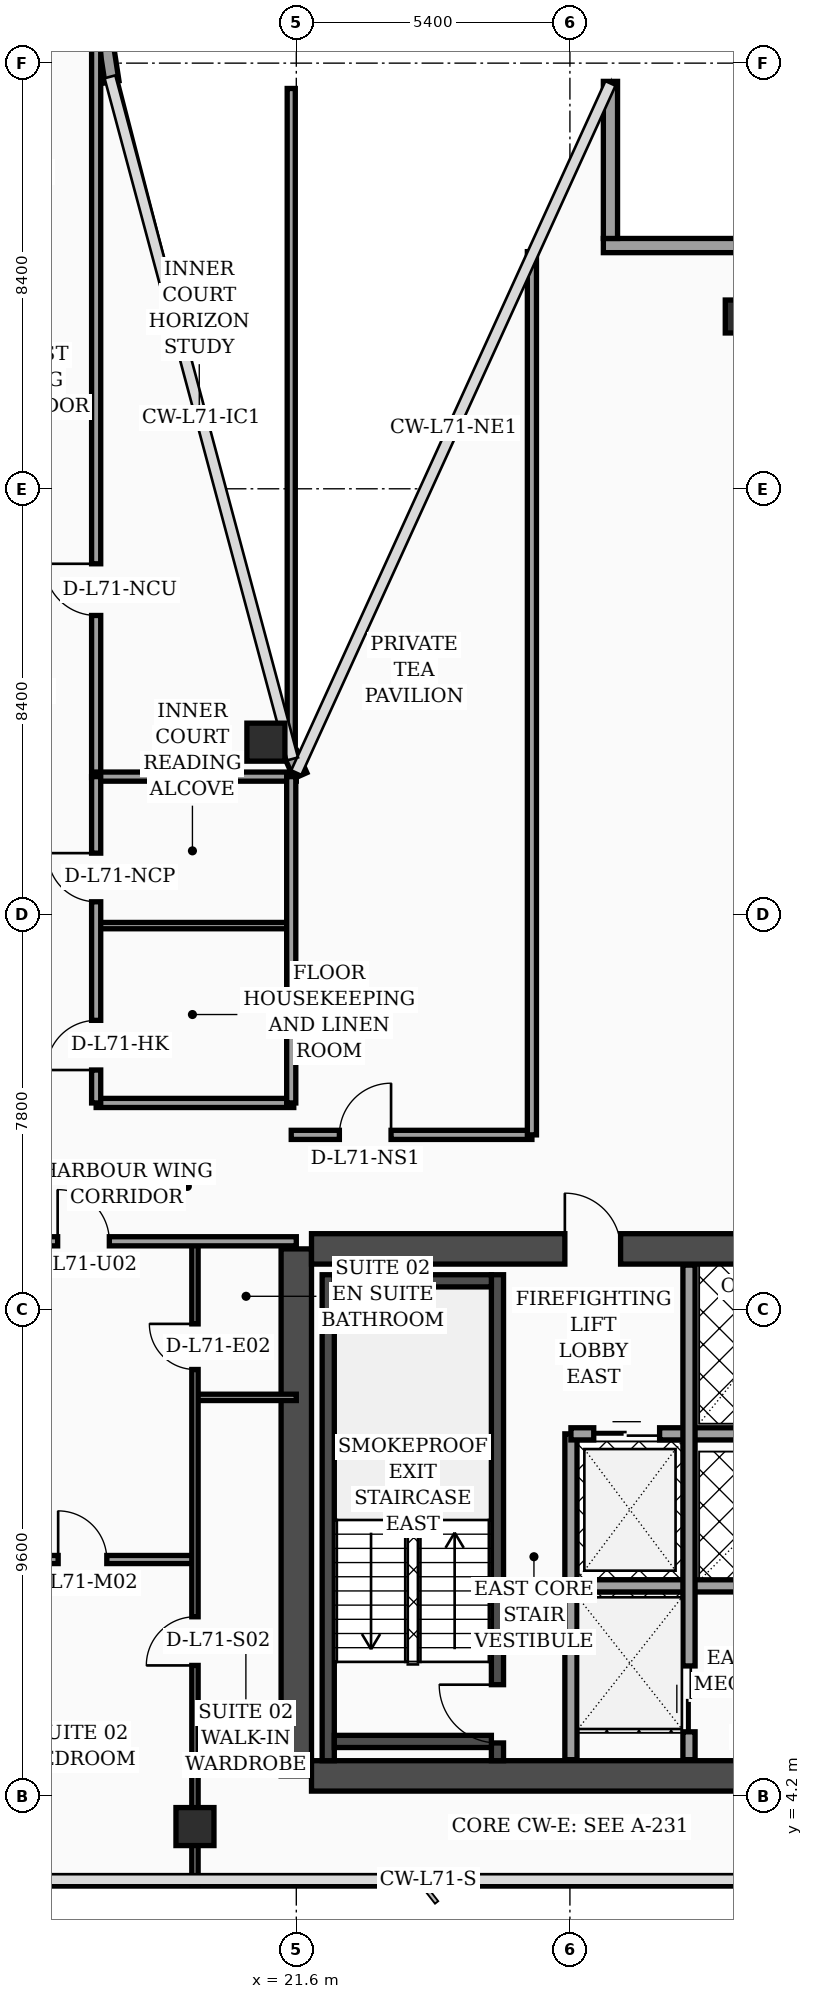
"""IFC4 building model, lengths in metres.
Left out: names, types, materials, properties, quantities, classifications, styles, units other than length and angle.
Written with IfcOpenShell. Run it as: python <this file> out.ifc"""

import sys

from ifc_helpers import new_model, si_unit, direction, frame, frame_2d, origin, origin_2d, place, context, subcontext, project, spatial, rectangle, hollow_rectangle, extrude, element, fill, save


model = new_model("IFC4")
c1 = context("Model", 3, precision=1e-05, world=origin(), true_north=direction((0.0, 1.0)))
c2 = subcontext(c1, "Body", "Model", "MODEL_VIEW")
j1 = project(units=[si_unit("LENGTHUNIT", "METRE"), si_unit("PLANEANGLEUNIT", "RADIAN")], contexts=[c1])
p1 = place(None, origin())
s1 = spatial("IfcSite", under=j1, at=p1, CompositionType="ELEMENT")
p2 = place(p1, origin())
s2 = spatial("IfcBuilding", under=s1, at=p2, CompositionType="ELEMENT")
p3 = place(p2, frame((0.0, 0.0, 287.3)))
s3 = spatial("IfcBuildingStorey", under=s2, at=p3, CompositionType="ELEMENT", Elevation=287.3)
p4 = place(p3, frame((21.6, 4.6, 0.0), z_axis=(0.0, 0.0, 1.0), x_axis=(0.0, 1.0, 0.0)))
e1 = element("IfcWall", 1, at=p4, inside=s3, PredefinedType="SHEAR", context=c2, shape_type="SweptSolid", body=[
    extrude(rectangle(XDim=10.4, YDim=0.6, at=frame_2d((5.2, 0.0))), origin(), (0.0, 0.0, 1.0), 3.56),
])
p5 = place(p3, frame((21.9, 15.0, 0.0), z_axis=(0.0, 0.0, 1.0), x_axis=(1.0, 0.0, 0.0)))
e2 = element("IfcWall", 2, at=p5, inside=s3, PredefinedType="SHEAR", context=c2, shape_type="SweptSolid", body=[
    extrude(rectangle(XDim=10.2, YDim=0.6, at=frame_2d((5.1, 0.0))), origin(), (0.0, 0.0, 1.0), 3.56),
])
p6 = place(p5, frame((5.0, 0.0, 0.0)))
e3 = element("IfcOpeningElement", 3, at=p6, cuts=e2, PredefinedType="OPENING", context=c2, shape_type="SweptSolid", body=[
    extrude(rectangle(XDim=1.1, YDim=2.2, at=frame_2d((0.55, 1.1))), frame((0.0, 0.31, 0.0), z_axis=(0.0, -1.0, 0.0), x_axis=(1.0, 0.0, 0.0)), (0.0, 0.0, 1.0), 0.62),
])
p7 = place(p3, frame((21.9, 4.6, 0.0), z_axis=(0.0, 0.0, 1.0), x_axis=(1.0, 0.0, 0.0)))
e4 = element("IfcWall", 4, at=p7, inside=s3, PredefinedType="SHEAR", context=c2, shape_type="SweptSolid", body=[
    extrude(rectangle(XDim=10.2, YDim=0.6, at=frame_2d((5.1, 0.0))), origin(), (0.0, 0.0, 1.0), 3.56),
])
p8 = place(p3, frame((22.23, 4.9, 0.0), z_axis=(0.0, 0.0, 1.0), x_axis=(0.0, 1.0, 0.0)))
e5 = element("IfcWall", 5, at=p8, inside=s3, PredefinedType="SOLIDWALL", context=c2, shape_type="SweptSolid", body=[
    extrude(rectangle(XDim=9.59, YDim=0.24, at=frame_2d((4.795, 0.0))), origin(), (0.0, 0.0, 1.0), 3.56),
])
p9 = place(p3, frame((25.57, 4.9, 0.0), z_axis=(0.0, 0.0, 1.0), x_axis=(0.0, 1.0, 0.0)))
e6 = element("IfcWall", 6, at=p9, inside=s3, PredefinedType="SOLIDWALL", context=c2, shape_type="SweptSolid", body=[
    extrude(rectangle(XDim=9.59, YDim=0.24, at=frame_2d((4.795, 0.0))), origin(), (0.0, 0.0, 1.0), 3.56),
])
p10 = place(p9, frame((0.35, 0.0, 0.0)))
e7 = element("IfcOpeningElement", 7, at=p10, cuts=e6, PredefinedType="OPENING", context=c2, shape_type="SweptSolid", body=[
    extrude(rectangle(XDim=1.15, YDim=2.2, at=frame_2d((0.575, 1.1))), frame((0.0, 0.13, 0.0), z_axis=(0.0, -1.0, 0.0), x_axis=(1.0, 0.0, 0.0)), (0.0, 0.0, 1.0), 0.26),
])
for number, where, z_axis, x_axis in (
    (8, (22.35, 5.28, 0.0), (0.0, 0.0, 1.0), (1.0, 0.0, 0.0)),
    (9, (22.35, 14.37, 0.0), (0.0, 0.0, 1.0), (1.0, 0.0, 0.0)),
):
    element("IfcWall", number, at=place(p3, frame(where, z_axis=z_axis, x_axis=x_axis)), inside=s3, PredefinedType="SOLIDWALL", context=c2, shape_type="SweptSolid", body=[
        extrude(rectangle(XDim=3.1, YDim=0.24, at=frame_2d((1.55, 0.0))), origin(), (0.0, 0.0, 1.0), 3.56),
    ])
for number, where, z_axis, x_axis in (
    (10, (21.0, 25.0, 0.0), (0.0, 0.0, 1.0), (1.0, 0.0, 0.0)),
    (11, (19.6, 3.6, 0.0), (0.0, 0.0, 1.0), (1.0, 0.0, 0.0)),
):
    element("IfcColumn", number, at=place(p3, frame(where, z_axis=z_axis, x_axis=x_axis)), inside=s3, PredefinedType="COLUMN", context=c2, shape_type="SweptSolid", body=[
        extrude(hollow_rectangle(XDim=0.75, YDim=0.75, WallThickness=0.032, at=origin_2d()), origin(), (0.0, 0.0, 1.0), 3.56),
    ])
p11 = place(p3, frame((30.391, 33.4, 0.0), z_axis=(0.0, 0.0, 1.0), x_axis=(1.0, 0.0, 0.0)))
e12 = element("IfcColumn", 12, at=p11, inside=s3, PredefinedType="COLUMN", context=c2, shape_type="SweptSolid", body=[
    extrude(hollow_rectangle(XDim=0.65, YDim=0.65, WallThickness=0.028, at=origin_2d()), origin(), (0.0, 0.0, 1.0), 3.56),
])
p12 = place(p3, frame((21.68, 24.34, 0.0), z_axis=(0.0, 0.0, 1.0), x_axis=(-0.40758134973, 0.913168901875, 0.0)))
e13 = element("IfcWall", 13, at=p12, inside=s3, PredefinedType="SOLIDWALL", context=c2, shape_type="SweptSolid", body=[
    extrude(rectangle(XDim=0.471, YDim=0.28, at=frame_2d((0.235, 0.0))), origin(), (0.0, 0.0, 1.0), 3.56),
])
p13 = place(p3, frame((17.962, 38.03, 0.0), z_axis=(0.0, 0.0, 1.0), x_axis=(-0.15141125477, 0.988470855377, 0.0)))
e14 = element("IfcWall", 14, at=p13, inside=s3, PredefinedType="SOLIDWALL", context=c2, shape_type="SweptSolid", body=[
    extrude(rectangle(XDim=0.739, YDim=0.28, at=frame_2d((0.369, 0.0))), origin(), (0.0, 0.0, 1.0), 3.56),
])
p14 = place(p3, frame((31.84, 34.8, 0.0), z_axis=(0.0, 0.0, 1.0), x_axis=(-1.0, 0.0, 0.0)))
e15 = element("IfcWall", 15, at=p14, inside=s3, PredefinedType="SOLIDWALL", context=c2, shape_type="SweptSolid", body=[
    extrude(rectangle(XDim=4.18, YDim=0.28, at=frame_2d((2.09, 0.0))), origin(), (0.0, 0.0, 1.0), 3.56),
])
p15 = place(p3, frame((27.8, 34.94, 0.0), z_axis=(0.0, 0.0, 1.0), x_axis=(0.0, 1.0, 0.0)))
e16 = element("IfcWall", 16, at=p15, inside=s3, PredefinedType="SOLIDWALL", context=c2, shape_type="SweptSolid", body=[
    extrude(rectangle(XDim=3.1, YDim=0.28, at=frame_2d((1.55, 0.0))), origin(), (0.0, 0.0, 1.0), 3.56),
])
p16 = place(p3, frame((27.02, 4.92, 0.0), z_axis=(0.0, 0.0, 1.0), x_axis=(0.0, 1.0, 0.0)))
e17 = element("IfcWall", 17, at=p16, inside=s3, PredefinedType="SOLIDWALL", context=c2, shape_type="SweptSolid", body=[
    extrude(rectangle(XDim=6.43, YDim=0.24, at=frame_2d((3.215, 0.0))), origin(), (0.0, 0.0, 1.0), 3.56),
])
p17 = place(p3, frame((27.02, 11.35, 0.0), z_axis=(0.0, 0.0, 1.0), x_axis=(1.0, 0.0, 0.0)))
e18 = element("IfcWall", 18, at=p17, inside=s3, PredefinedType="SOLIDWALL", context=c2, shape_type="SweptSolid", body=[
    extrude(rectangle(XDim=5.06, YDim=0.24, at=frame_2d((2.53, 0.0))), origin(), (0.0, 0.0, 1.0), 3.56),
])
p18 = place(p17, frame((0.45, 0.0, 0.0)))
e19 = element("IfcOpeningElement", 19, at=p18, cuts=e18, PredefinedType="OPENING", context=c2, shape_type="SweptSolid", body=[
    extrude(rectangle(XDim=1.3, YDim=2.35, at=frame_2d((0.65, 1.175))), frame((0.0, 0.13, 0.0), z_axis=(0.0, -1.0, 0.0), x_axis=(1.0, 0.0, 0.0)), (0.0, 0.0, 1.0), 0.26),
])
p19 = place(p3, frame((27.02, 8.35, 0.0), z_axis=(0.0, 0.0, 1.0), x_axis=(1.0, 0.0, 0.0)))
e20 = element("IfcWall", 20, at=p19, inside=s3, PredefinedType="SOLIDWALL", context=c2, shape_type="SweptSolid", body=[
    extrude(rectangle(XDim=5.06, YDim=0.24, at=frame_2d((2.53, 0.0))), origin(), (0.0, 0.0, 1.0), 3.09),
])
p20 = place(p3, frame((29.35, 4.92, 0.0), z_axis=(0.0, 0.0, 1.0), x_axis=(0.0, 1.0, 0.0)))
e21 = element("IfcWall", 21, at=p20, inside=s3, PredefinedType="SOLIDWALL", context=c2, shape_type="SweptSolid", body=[
    extrude(rectangle(XDim=9.76, YDim=0.24, at=frame_2d((4.88, 0.0))), origin(), (0.0, 0.0, 1.0), 3.56),
])
p21 = place(p20, frame((0.55, 0.0, 0.0)))
e22 = element("IfcOpeningElement", 22, at=p21, cuts=e21, PredefinedType="OPENING", context=c2, shape_type="SweptSolid", body=[
    extrude(rectangle(XDim=1.3, YDim=2.35, at=frame_2d((0.65, 1.175))), frame((0.0, 0.13, 0.0), z_axis=(0.0, -1.0, 0.0), x_axis=(1.0, 0.0, 0.0)), (0.0, 0.0, 1.0), 0.26),
])
p22 = place(p3, frame((19.6, 12.07, 0.0), z_axis=(0.0, 0.0, 1.0), x_axis=(1.0, 0.0, 0.0)))
e23 = element("IfcWall", 23, at=p22, inside=s3, PredefinedType="PARTITIONING", context=c2, shape_type="SweptSolid", body=[
    extrude(rectangle(XDim=2.0, YDim=0.125, at=frame_2d((1.0, 0.0))), origin(), (0.0, 0.0, 1.0), 3.56),
])
p23 = place(p3, frame((15.15, 8.87, 0.0), z_axis=(0.0, 0.0, 1.0), x_axis=(1.0, 0.0, 0.0)))
e24 = element("IfcWall", 24, at=p23, inside=s3, PredefinedType="PARTITIONING", context=c2, shape_type="SweptSolid", body=[
    extrude(rectangle(XDim=4.45, YDim=0.16, at=frame_2d((2.225, 0.0))), origin(), (0.0, 0.0, 1.0), 3.56),
])
p24 = place(p23, frame((1.75, 0.0, 0.0)))
e25 = element("IfcOpeningElement", 25, at=p24, cuts=e24, PredefinedType="OPENING", context=c2, shape_type="SweptSolid", body=[
    extrude(rectangle(XDim=0.96, YDim=2.2, at=frame_2d((0.48, 1.1))), frame((0.0, 0.09, 0.0), z_axis=(0.0, -1.0, 0.0), x_axis=(1.0, 0.0, 0.0)), (0.0, 0.0, 1.0), 0.18),
])
p25 = place(p3, frame((19.6, 2.44, 0.0), z_axis=(0.0, 0.0, 1.0), x_axis=(0.0, 1.0, 0.0)))
e26 = element("IfcWall", 26, at=p25, inside=s3, PredefinedType="PARTITIONING", context=c2, shape_type="SweptSolid", body=[
    extrude(rectangle(XDim=12.71, YDim=0.125, at=frame_2d((6.355, 0.0))), origin(), (0.0, 0.0, 1.0), 2.59),
])
p26 = place(p25, frame((4.34, 0.0, 0.0)))
e27 = element("IfcOpeningElement", 27, at=p26, cuts=e26, PredefinedType="OPENING", context=c2, shape_type="SweptSolid", body=[
    extrude(rectangle(XDim=0.96, YDim=2.2, at=frame_2d((0.48, 1.1))), frame((0.0, 0.073, 0.0), z_axis=(0.0, -1.0, 0.0), x_axis=(1.0, 0.0, 0.0)), (0.0, 0.0, 1.0), 0.145),
])
p27 = place(p25, frame((10.18, 0.0, 0.0)))
e28 = element("IfcOpeningElement", 28, at=p27, cuts=e26, PredefinedType="OPENING", context=c2, shape_type="SweptSolid", body=[
    extrude(rectangle(XDim=0.9, YDim=2.15, at=frame_2d((0.45, 1.075))), frame((0.0, 0.073, 0.0), z_axis=(0.0, -1.0, 0.0), x_axis=(1.0, 0.0, 0.0)), (0.0, 0.0, 1.0), 0.145),
])
p28 = place(p3, frame((15.15, 15.15, 0.0), z_axis=(0.0, 0.0, 1.0), x_axis=(1.0, 0.0, 0.0)))
e29 = element("IfcWall", 29, at=p28, inside=s3, PredefinedType="PARTITIONING", context=c2, shape_type="SweptSolid", body=[
    extrude(rectangle(XDim=6.45, YDim=0.18, at=frame_2d((3.225, 0.0))), origin(), (0.0, 0.0, 1.0), 2.59),
])
p29 = place(p28, frame((1.74, 0.0, 0.0)))
e30 = element("IfcOpeningElement", 30, at=p29, cuts=e29, PredefinedType="OPENING", context=c2, shape_type="SweptSolid", body=[
    extrude(rectangle(XDim=1.02, YDim=2.2, at=frame_2d((0.51, 1.1))), frame((0.0, 0.1, 0.0), z_axis=(0.0, -1.0, 0.0), x_axis=(1.0, 0.0, 0.0)), (0.0, 0.0, 1.0), 0.2),
])
p30 = place(p3, frame((17.65, 24.3, 0.0), z_axis=(0.0, 0.0, 1.0), x_axis=(0.0, 1.0, 0.0)))
e31 = element("IfcWall", 31, at=p30, inside=s3, PredefinedType="PARTITIONING", context=c2, shape_type="SweptSolid", body=[
    extrude(rectangle(XDim=18.15, YDim=0.18, at=frame_2d((9.075, 0.0))), origin(), (0.0, 0.0, 1.0), 2.99),
])
p31 = place(p30, frame((3.2, 0.0, 0.0)))
e32 = element("IfcOpeningElement", 32, at=p31, cuts=e31, PredefinedType="OPENING", context=c2, shape_type="SweptSolid", body=[
    extrude(rectangle(XDim=1.02, YDim=2.2, at=frame_2d((0.51, 1.1))), frame((0.0, 0.1, 0.0), z_axis=(0.0, -1.0, 0.0), x_axis=(1.0, 0.0, 0.0)), (0.0, 0.0, 1.0), 0.2),
])
p32 = place(p3, frame((17.65, 17.88, 0.0), z_axis=(0.0, 0.0, 1.0), x_axis=(1.0, 0.0, 0.0)))
e33 = element("IfcWall", 33, at=p32, inside=s3, PredefinedType="PARTITIONING", context=c2, shape_type="SweptSolid", body=[
    extrude(rectangle(XDim=3.9, YDim=0.18, at=frame_2d((1.95, 0.0))), origin(), (0.0, 0.0, 1.0), 3.56),
])
p33 = place(p3, frame((17.65, 21.38, 0.0), z_axis=(0.0, 0.0, 1.0), x_axis=(1.0, 0.0, 0.0)))
e34 = element("IfcWall", 34, at=p33, inside=s3, PredefinedType="PARTITIONING", context=c2, shape_type="SweptSolid", body=[
    extrude(rectangle(XDim=3.9, YDim=0.125, at=frame_2d((1.95, 0.0))), origin(), (0.0, 0.0, 1.0), 3.56),
])
p34 = place(p3, frame((17.65, 24.32, 0.0), z_axis=(0.0, 0.0, 1.0), x_axis=(1.0, 0.0, 0.0)))
e35 = element("IfcWall", 35, at=p34, inside=s3, PredefinedType="PARTITIONING", context=c2, shape_type="SweptSolid", body=[
    extrude(rectangle(XDim=3.95, YDim=0.18, at=frame_2d((1.975, 0.0))), origin(), (0.0, 0.0, 1.0), 3.56),
])
p35 = place(p3, frame((21.5, 17.88, 0.0), z_axis=(0.0, 0.0, 1.0), x_axis=(0.0, 1.0, 0.0)))
e36 = element("IfcWall", 36, at=p35, inside=s3, PredefinedType="PARTITIONING", context=c2, shape_type="SweptSolid", body=[
    extrude(rectangle(XDim=6.44, YDim=0.18, at=frame_2d((3.22, 0.0))), origin(), (0.0, 0.0, 1.0), 3.56),
])
p36 = place(p3, frame((17.65, 17.88, 0.0), z_axis=(0.0, 0.0, 1.0), x_axis=(0.0, 1.0, 0.0)))
e37 = element("IfcWall", 37, at=p36, inside=s3, PredefinedType="PARTITIONING", context=c2, shape_type="SweptSolid", body=[
    extrude(rectangle(XDim=6.44, YDim=0.18, at=frame_2d((3.22, 0.0))), origin(), (0.0, 0.0, 1.0), 3.56),
])
p37 = place(p36, frame((0.65, 0.0, 0.0)))
e38 = element("IfcOpeningElement", 38, at=p37, cuts=e37, PredefinedType="OPENING", context=c2, shape_type="SweptSolid", body=[
    extrude(rectangle(XDim=0.98, YDim=2.15, at=frame_2d((0.49, 1.075))), frame((0.0, 0.1, 0.0), z_axis=(0.0, -1.0, 0.0), x_axis=(1.0, 0.0, 0.0)), (0.0, 0.0, 1.0), 0.2),
])
p38 = place(p36, frame((3.97, 0.0, 0.0)))
e39 = element("IfcOpeningElement", 39, at=p38, cuts=e37, PredefinedType="OPENING", context=c2, shape_type="SweptSolid", body=[
    extrude(rectangle(XDim=0.96, YDim=2.2, at=frame_2d((0.48, 1.1))), frame((0.0, 0.1, 0.0), z_axis=(0.0, -1.0, 0.0), x_axis=(1.0, 0.0, 0.0)), (0.0, 0.0, 1.0), 0.2),
])
p39 = place(p3, frame((21.5, 24.85, 0.0), z_axis=(0.0, 0.0, 1.0), x_axis=(0.0, 1.0, 0.0)))
e40 = element("IfcWall", 40, at=p39, inside=s3, PredefinedType="PARTITIONING", context=c2, shape_type="SweptSolid", body=[
    extrude(rectangle(XDim=13.05, YDim=0.16, at=frame_2d((6.525, 0.0))), origin(), (0.0, 0.0, 1.0), 2.99),
])
p40 = place(p3, frame((21.5, 17.25, 0.0), z_axis=(0.0, 0.0, 1.0), x_axis=(1.0, 0.0, 0.0)))
e41 = element("IfcWall", 41, at=p40, inside=s3, PredefinedType="PARTITIONING", context=c2, shape_type="SweptSolid", body=[
    extrude(rectangle(XDim=4.75, YDim=0.18, at=frame_2d((2.375, 0.0))), origin(), (0.0, 0.0, 1.0), 3.56),
])
p41 = place(p40, frame((0.95, 0.0, 0.0)))
e42 = element("IfcOpeningElement", 42, at=p41, cuts=e41, PredefinedType="OPENING", context=c2, shape_type="SweptSolid", body=[
    extrude(rectangle(XDim=1.02, YDim=2.2, at=frame_2d((0.51, 1.1))), frame((0.0, 0.1, 0.0), z_axis=(0.0, -1.0, 0.0), x_axis=(1.0, 0.0, 0.0)), (0.0, 0.0, 1.0), 0.2),
])
p42 = place(p3, frame((26.25, 17.25, 0.0), z_axis=(0.0, 0.0, 1.0), x_axis=(0.0, 1.0, 0.0)))
e43 = element("IfcWall", 43, at=p42, inside=s3, PredefinedType="PARTITIONING", context=c2, shape_type="SweptSolid", body=[
    extrude(rectangle(XDim=17.43, YDim=0.18, at=frame_2d((8.715, 0.0))), origin(), (0.0, 0.0, 1.0), 3.09),
])
p43 = place(p18, origin())
e44 = element("IfcDoor", 44, at=p43, inside=s3, OperationType="DOUBLE_DOOR_SLIDING", PredefinedType="DOOR", context=c2, shape_type="SweptSolid", body=[
    extrude(rectangle(XDim=1.3, YDim=2.35, at=frame_2d((0.65, 1.175))), frame((0.0, 0.025, 0.0), z_axis=(0.0, -1.0, 0.0), x_axis=(1.0, 0.0, 0.0)), (0.0, 0.0, 1.0), 0.05),
])
fill(e19, e44)
p44 = place(p21, origin())
e45 = element("IfcDoor", 45, at=p44, inside=s3, OperationType="DOUBLE_DOOR_SLIDING", PredefinedType="DOOR", context=c2, shape_type="SweptSolid", body=[
    extrude(rectangle(XDim=1.3, YDim=2.35, at=frame_2d((0.65, 1.175))), frame((0.0, 0.025, 0.0), z_axis=(0.0, -1.0, 0.0), x_axis=(1.0, 0.0, 0.0)), (0.0, 0.0, 1.0), 0.05),
])
fill(e22, e45)
p45 = place(p24, origin())
e46 = element("IfcDoor", 46, at=p45, inside=s3, OperationType="SINGLE_SWING_LEFT", PredefinedType="DOOR", context=c2, shape_type="SweptSolid", body=[
    extrude(rectangle(XDim=0.96, YDim=2.2, at=frame_2d((0.48, 1.1))), frame((0.0, 0.025, 0.0), z_axis=(0.0, -1.0, 0.0), x_axis=(1.0, 0.0, 0.0)), (0.0, 0.0, 1.0), 0.05),
])
fill(e25, e46)
p46 = place(p26, origin())
e47 = element("IfcDoor", 47, at=p46, inside=s3, OperationType="SINGLE_SWING_LEFT", PredefinedType="DOOR", context=c2, shape_type="SweptSolid", body=[
    extrude(rectangle(XDim=0.96, YDim=2.2, at=frame_2d((0.48, 1.1))), frame((0.0, 0.025, 0.0), z_axis=(0.0, -1.0, 0.0), x_axis=(1.0, 0.0, 0.0)), (0.0, 0.0, 1.0), 0.05),
])
fill(e27, e47)
p47 = place(p27, origin())
e48 = element("IfcDoor", 48, at=p47, inside=s3, OperationType="SINGLE_SWING_RIGHT", PredefinedType="DOOR", context=c2, shape_type="SweptSolid", body=[
    extrude(rectangle(XDim=0.9, YDim=2.15, at=frame_2d((0.45, 1.075))), frame((0.0, 0.025, 0.0), z_axis=(0.0, -1.0, 0.0), x_axis=(1.0, 0.0, 0.0)), (0.0, 0.0, 1.0), 0.05),
])
fill(e28, e48)
p48 = place(p29, origin())
e49 = element("IfcDoor", 49, at=p48, inside=s3, OperationType="SINGLE_SWING_LEFT", PredefinedType="DOOR", context=c2, shape_type="SweptSolid", body=[
    extrude(rectangle(XDim=1.02, YDim=2.2, at=frame_2d((0.51, 1.1))), frame((0.0, 0.025, 0.0), z_axis=(0.0, -1.0, 0.0), x_axis=(1.0, 0.0, 0.0)), (0.0, 0.0, 1.0), 0.05),
])
fill(e30, e49)
p49 = place(p31, origin())
e50 = element("IfcDoor", 50, at=p49, inside=s3, OperationType="SINGLE_SWING_RIGHT", PredefinedType="DOOR", context=c2, shape_type="SweptSolid", body=[
    extrude(rectangle(XDim=1.02, YDim=2.2, at=frame_2d((0.51, 1.1))), frame((0.0, 0.025, 0.0), z_axis=(0.0, -1.0, 0.0), x_axis=(1.0, 0.0, 0.0)), (0.0, 0.0, 1.0), 0.05),
])
fill(e32, e50)
p50 = place(p37, origin())
e51 = element("IfcDoor", 51, at=p50, inside=s3, OperationType="SINGLE_SWING_LEFT", PredefinedType="DOOR", context=c2, shape_type="SweptSolid", body=[
    extrude(rectangle(XDim=0.98, YDim=2.15, at=frame_2d((0.49, 1.075))), frame((0.0, 0.025, 0.0), z_axis=(0.0, -1.0, 0.0), x_axis=(1.0, 0.0, 0.0)), (0.0, 0.0, 1.0), 0.05),
])
fill(e38, e51)
p51 = place(p38, origin())
e52 = element("IfcDoor", 52, at=p51, inside=s3, OperationType="SINGLE_SWING_RIGHT", PredefinedType="DOOR", context=c2, shape_type="SweptSolid", body=[
    extrude(rectangle(XDim=0.96, YDim=2.2, at=frame_2d((0.48, 1.1))), frame((0.0, 0.025, 0.0), z_axis=(0.0, -1.0, 0.0), x_axis=(1.0, 0.0, 0.0)), (0.0, 0.0, 1.0), 0.05),
])
fill(e39, e52)
p52 = place(p41, origin())
e53 = element("IfcDoor", 53, at=p52, inside=s3, OperationType="SINGLE_SWING_RIGHT", PredefinedType="DOOR", context=c2, shape_type="SweptSolid", body=[
    extrude(rectangle(XDim=1.02, YDim=2.2, at=frame_2d((0.51, 1.1))), frame((0.0, 0.025, 0.0), z_axis=(0.0, -1.0, 0.0), x_axis=(1.0, 0.0, 0.0)), (0.0, 0.0, 1.0), 0.05),
])
fill(e42, e53)
p53 = place(p10, origin())
e54 = element("IfcDoor", 54, at=p53, inside=s3, OperationType="SINGLE_SWING_RIGHT", PredefinedType="DOOR", context=c2, shape_type="SweptSolid", body=[
    extrude(rectangle(XDim=1.15, YDim=2.2, at=frame_2d((0.575, 1.1))), frame((0.0, 0.025, 0.0), z_axis=(0.0, -1.0, 0.0), x_axis=(1.0, 0.0, 0.0)), (0.0, 0.0, 1.0), 0.05),
])
fill(e7, e54)
p54 = place(p6, origin())
e55 = element("IfcDoor", 55, at=p54, inside=s3, OperationType="SINGLE_SWING_LEFT", PredefinedType="DOOR", context=c2, shape_type="SweptSolid", body=[
    extrude(rectangle(XDim=1.1, YDim=2.2, at=frame_2d((0.55, 1.1))), frame((0.0, 0.025, 0.0), z_axis=(0.0, -1.0, 0.0), x_axis=(1.0, 0.0, 0.0)), (0.0, 0.0, 1.0), 0.05),
])
fill(e3, e55)
save(model, sys.argv[1])
